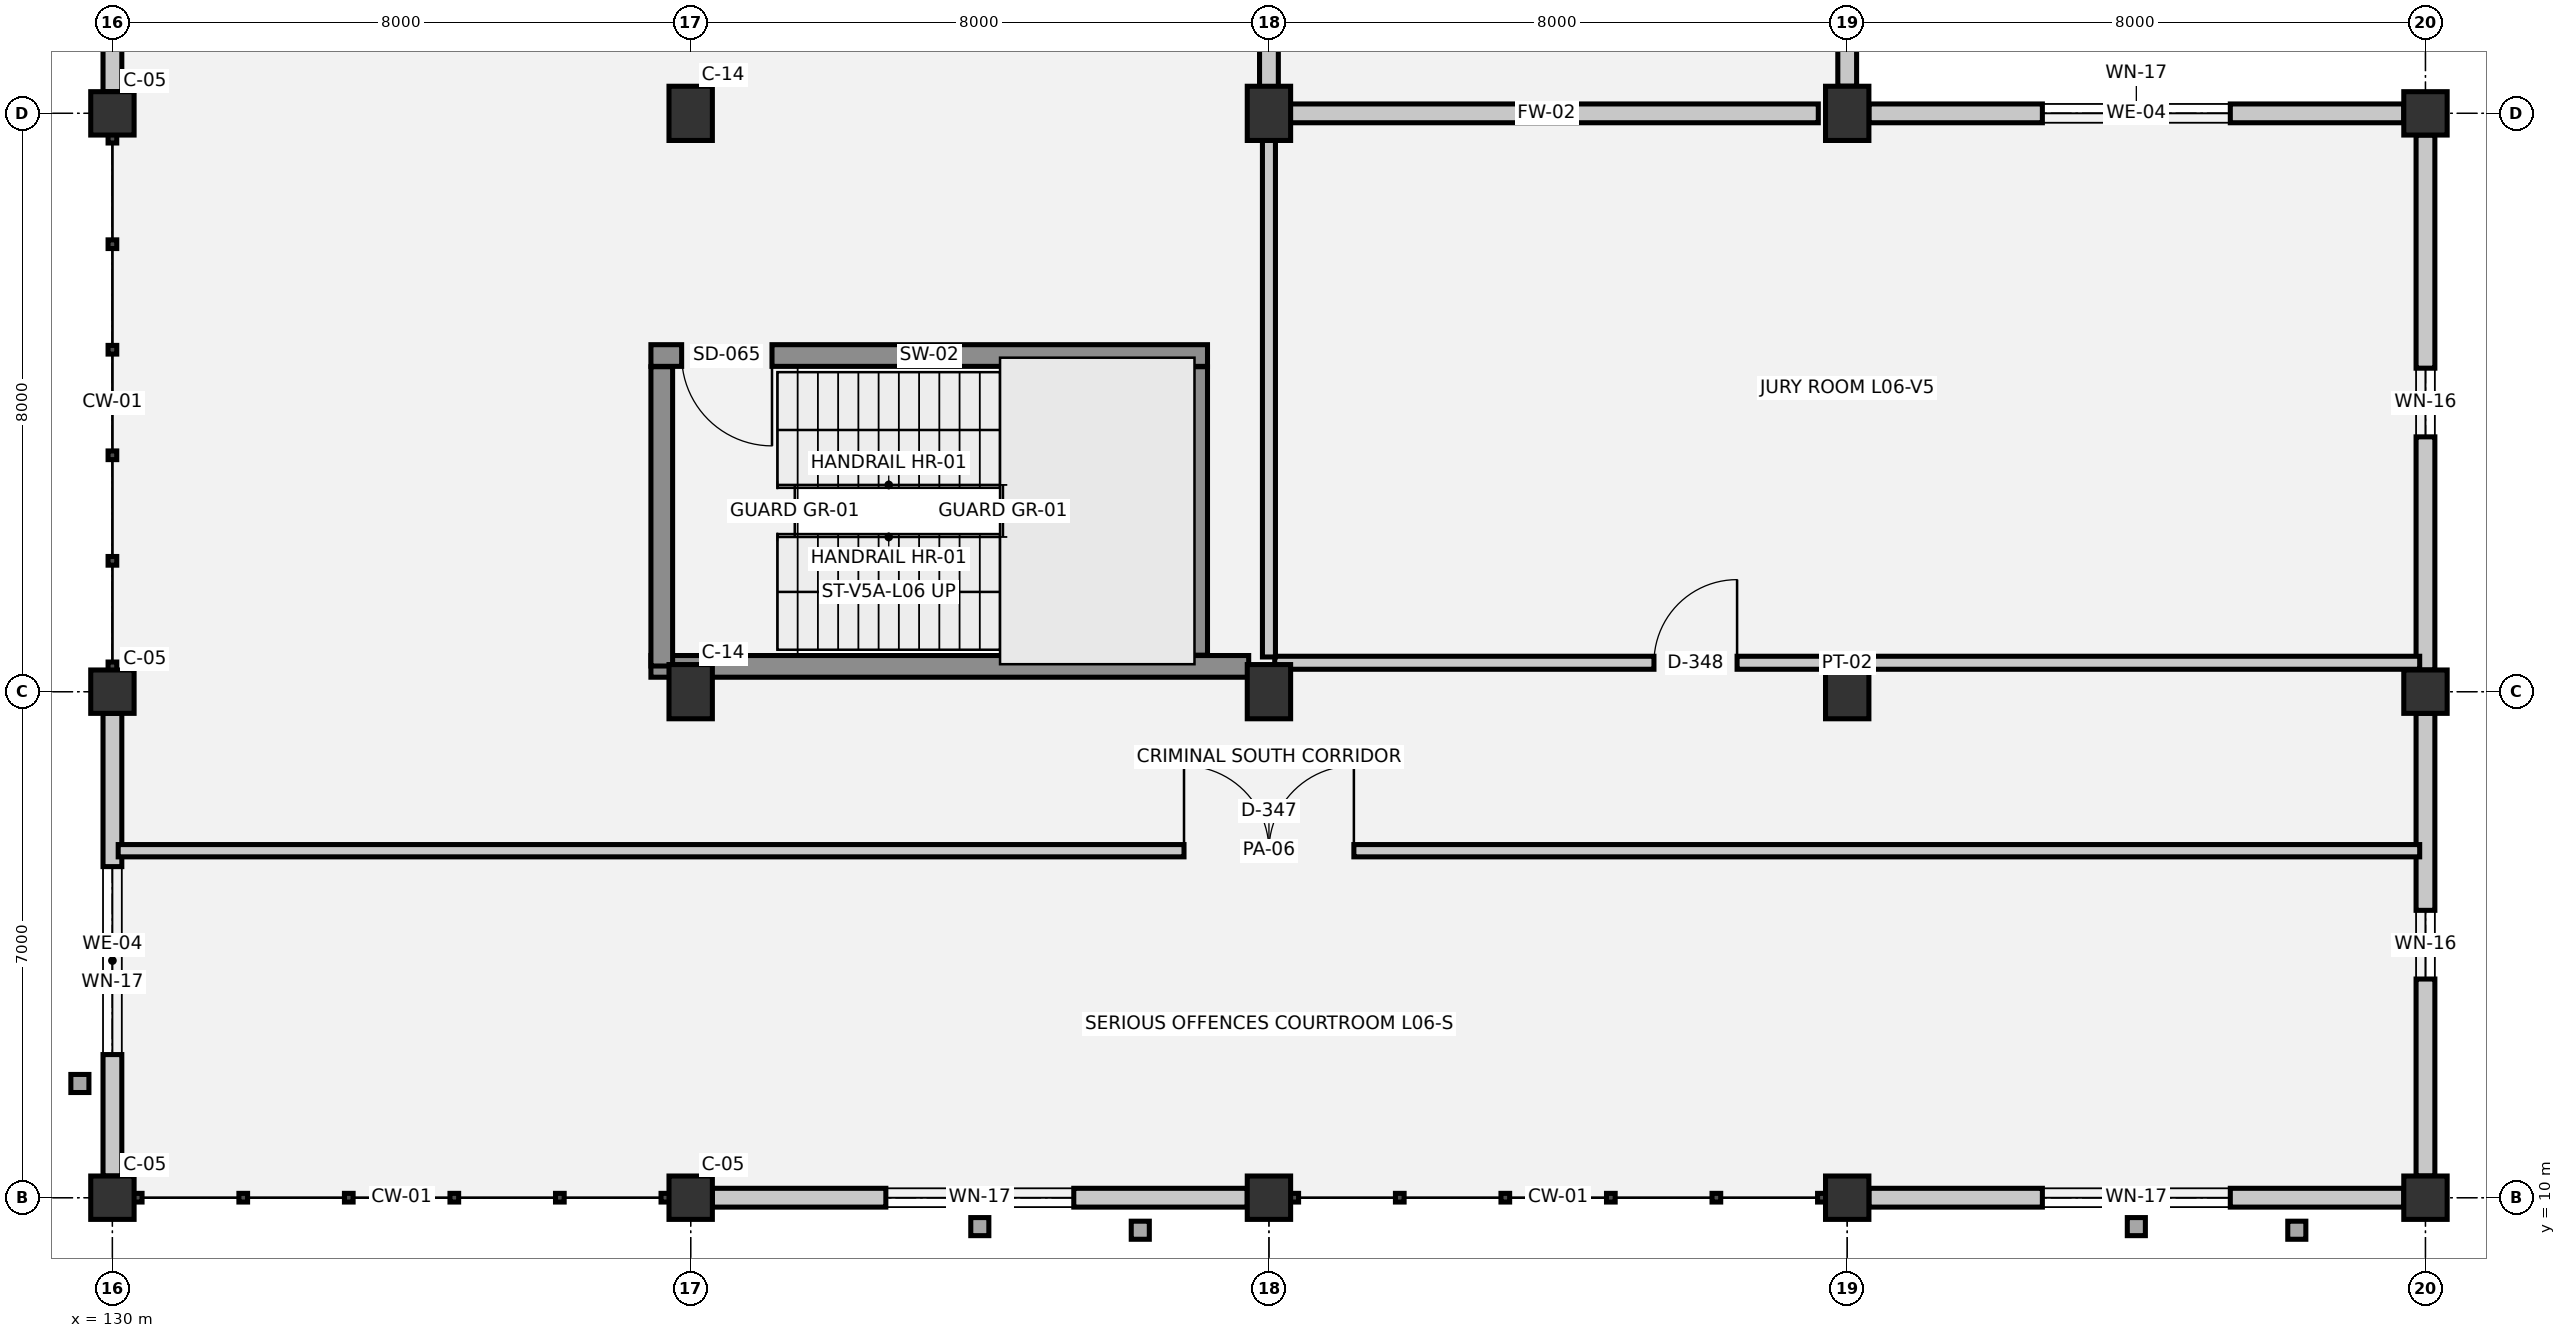
"""IFC4 building model, lengths in metres.
Left out: names, types, materials, properties, quantities, classifications, styles, units other than length and angle.
Written with IfcOpenShell. Run it as: python <this file> out.ifc"""

import sys

from ifc_helpers import new_model, si_unit, direction, frame, frame_2d, origin, origin_2d, place, context, subcontext, project, spatial, rectangle, extrude, element, fill, save


model = new_model("IFC4")
c1 = context("Model", 3, precision=1e-05, world=origin(), true_north=direction((0.0, 1.0)))
c2 = subcontext(c1, "Body", "Model", "MODEL_VIEW")
j1 = project(units=[si_unit("LENGTHUNIT", "METRE"), si_unit("PLANEANGLEUNIT", "RADIAN")], contexts=[c1])
p1 = place(None, origin())
s1 = spatial("IfcSite", under=j1, at=p1, CompositionType="ELEMENT")
p2 = place(p1, origin())
s2 = spatial("IfcBuilding", under=s1, at=p2, CompositionType="ELEMENT")
p3 = place(p2, frame((0.0, 0.0, 22.05)))
s3 = spatial("IfcBuildingStorey", under=s2, at=p3, CompositionType="ELEMENT", Elevation=22.05)
for number, where, z_axis, x_axis in (
    (1, (130.0, 10.0, 0.0), (0.0, 0.0, 1.0), (1.0, 0.0, 0.0)),
    (2, (130.0, 17.0, 0.0), (0.0, 0.0, 1.0), (1.0, 0.0, 0.0)),
    (3, (130.0, 25.0, 0.0), (0.0, 0.0, 1.0), (1.0, 0.0, 0.0)),
    (4, (138.0, 10.0, 0.0), (0.0, 0.0, 1.0), (1.0, 0.0, 0.0)),
):
    element("IfcColumn", number, at=place(p3, frame(where, z_axis=z_axis, x_axis=x_axis)), inside=s3, PredefinedType="COLUMN", context=c2, shape_type="SweptSolid", body=[
        extrude(rectangle(XDim=0.6, YDim=0.6, at=origin_2d()), origin(), (0.0, 0.0, 1.0), 3.75),
    ])
for number, where, z_axis, x_axis in (
    (5, (138.0, 17.0, 0.0), (0.0, 0.0, 1.0), (1.0, 0.0, 0.0)),
    (6, (138.0, 25.0, 0.0), (0.0, 0.0, 1.0), (1.0, 0.0, 0.0)),
):
    element("IfcColumn", number, at=place(p3, frame(where, z_axis=z_axis, x_axis=x_axis)), inside=s3, PredefinedType="COLUMN", context=c2, shape_type="SweptSolid", body=[
        extrude(rectangle(XDim=0.6, YDim=0.75, at=origin_2d()), origin(), (0.0, 0.0, 1.0), 3.75),
    ])
p4 = place(p3, frame((146.0, 10.0, 0.0), z_axis=(0.0, 0.0, 1.0), x_axis=(1.0, 0.0, 0.0)))
e7 = element("IfcColumn", 7, at=p4, inside=s3, PredefinedType="COLUMN", context=c2, shape_type="SweptSolid", body=[
    extrude(rectangle(XDim=0.6, YDim=0.6, at=origin_2d()), origin(), (0.0, 0.0, 1.0), 3.75),
])
for number, where, z_axis, x_axis in (
    (8, (146.0, 17.0, 0.0), (0.0, 0.0, 1.0), (1.0, 0.0, 0.0)),
    (9, (146.0, 25.0, 0.0), (0.0, 0.0, 1.0), (1.0, 0.0, 0.0)),
):
    element("IfcColumn", number, at=place(p3, frame(where, z_axis=z_axis, x_axis=x_axis)), inside=s3, PredefinedType="COLUMN", context=c2, shape_type="SweptSolid", body=[
        extrude(rectangle(XDim=0.6, YDim=0.75, at=origin_2d()), origin(), (0.0, 0.0, 1.0), 3.75),
    ])
p5 = place(p3, frame((154.0, 10.0, 0.0), z_axis=(0.0, 0.0, 1.0), x_axis=(1.0, 0.0, 0.0)))
e10 = element("IfcColumn", 10, at=p5, inside=s3, PredefinedType="COLUMN", context=c2, shape_type="SweptSolid", body=[
    extrude(rectangle(XDim=0.6, YDim=0.6, at=origin_2d()), origin(), (0.0, 0.0, 1.0), 3.75),
])
for number, where, z_axis, x_axis in (
    (11, (154.0, 17.0, 0.0), (0.0, 0.0, 1.0), (1.0, 0.0, 0.0)),
    (12, (154.0, 25.0, 0.0), (0.0, 0.0, 1.0), (1.0, 0.0, 0.0)),
):
    element("IfcColumn", number, at=place(p3, frame(where, z_axis=z_axis, x_axis=x_axis)), inside=s3, PredefinedType="COLUMN", context=c2, shape_type="SweptSolid", body=[
        extrude(rectangle(XDim=0.6, YDim=0.75, at=origin_2d()), origin(), (0.0, 0.0, 1.0), 3.75),
    ])
for number, where, z_axis, x_axis in (
    (13, (162.0, 10.0, 0.0), (0.0, 0.0, 1.0), (1.0, 0.0, 0.0)),
    (14, (162.0, 17.0, 0.0), (0.0, 0.0, 1.0), (1.0, 0.0, 0.0)),
    (15, (162.0, 25.0, 0.0), (0.0, 0.0, 1.0), (1.0, 0.0, 0.0)),
):
    element("IfcColumn", number, at=place(p3, frame(where, z_axis=z_axis, x_axis=x_axis)), inside=s3, PredefinedType="COLUMN", context=c2, shape_type="SweptSolid", body=[
        extrude(rectangle(XDim=0.6, YDim=0.6, at=origin_2d()), origin(), (0.0, 0.0, 1.0), 3.75),
    ])
p6 = place(p3, frame((130.0, 10.3, 0.0), z_axis=(0.0, 0.0, 1.0), x_axis=(0.0, 1.0, 0.0)))
e16 = element("IfcWall", 16, at=p6, inside=s3, PredefinedType="SOLIDWALL", context=c2, shape_type="SweptSolid", body=[
    extrude(rectangle(XDim=6.4, YDim=0.26, at=frame_2d((3.2, 0.0))), origin(), (0.0, 0.0, 1.0), 2.51),
])
p7 = place(p6, frame((1.68, 0.0, 1.0)))
e17 = element("IfcOpeningElement", 17, at=p7, cuts=e16, PredefinedType="OPENING", context=c2, shape_type="SweptSolid", body=[
    extrude(rectangle(XDim=2.6, YDim=1.1, at=frame_2d((1.3, 0.55))), frame((0.0, 0.14, 0.0), z_axis=(0.0, -1.0, 0.0), x_axis=(1.0, 0.0, 0.0)), (0.0, 0.0, 1.0), 0.28),
])
p8 = place(p3, frame((130.0, 25.3, 0.0), z_axis=(0.0, 0.0, 1.0), x_axis=(0.0, 1.0, 0.0)))
e18 = element("IfcWall", 18, at=p8, inside=s3, PredefinedType="SOLIDWALL", context=c2, shape_type="SweptSolid", body=[
    extrude(rectangle(XDim=6.4, YDim=0.26, at=frame_2d((3.2, 0.0))), origin(), (0.0, 0.0, 1.0), 2.51),
])
p9 = place(p8, frame((1.9, 0.0, 1.0)))
e19 = element("IfcOpeningElement", 19, at=p9, cuts=e18, PredefinedType="OPENING", context=c2, shape_type="SweptSolid", body=[
    extrude(rectangle(XDim=2.6, YDim=1.1, at=frame_2d((1.3, 0.55))), frame((0.0, 0.14, 0.0), z_axis=(0.0, -1.0, 0.0), x_axis=(1.0, 0.0, 0.0)), (0.0, 0.0, 1.0), 0.28),
])
p10 = place(p3, frame((154.0, 31.625, 0.0), z_axis=(0.0, 0.0, 1.0), x_axis=(0.0, -1.0, 0.0)))
e20 = element("IfcWall", 20, at=p10, inside=s3, PredefinedType="SOLIDWALL", context=c2, shape_type="SweptSolid", body=[
    extrude(rectangle(XDim=6.25, YDim=0.26, at=frame_2d((3.125, 0.0))), origin(), (0.0, 0.0, 1.0), 2.51),
])
p11 = place(p10, frame((2.65, 0.0, 1.0)))
e21 = element("IfcOpeningElement", 21, at=p11, cuts=e20, PredefinedType="OPENING", context=c2, shape_type="SweptSolid", body=[
    extrude(rectangle(XDim=0.95, YDim=1.1, at=frame_2d((0.475, 0.55))), frame((0.0, 0.14, 0.0), z_axis=(0.0, -1.0, 0.0), x_axis=(1.0, 0.0, 0.0)), (0.0, 0.0, 1.0), 0.28),
])
p12 = place(p3, frame((154.3, 25.0, 0.0), z_axis=(0.0, 0.0, 1.0), x_axis=(1.0, 0.0, 0.0)))
e22 = element("IfcWall", 22, at=p12, inside=s3, PredefinedType="SOLIDWALL", context=c2, shape_type="SweptSolid", body=[
    extrude(rectangle(XDim=7.4, YDim=0.26, at=frame_2d((3.7, 0.0))), origin(), (0.0, 0.0, 1.0), 2.51),
])
p13 = place(p12, frame((2.4, 0.0, 1.0)))
e23 = element("IfcOpeningElement", 23, at=p13, cuts=e22, PredefinedType="OPENING", context=c2, shape_type="SweptSolid", body=[
    extrude(rectangle(XDim=2.6, YDim=1.1, at=frame_2d((1.3, 0.55))), frame((0.0, 0.14, 0.0), z_axis=(0.0, -1.0, 0.0), x_axis=(1.0, 0.0, 0.0)), (0.0, 0.0, 1.0), 0.28),
])
p14 = place(p3, frame((162.0, 24.7, 0.0), z_axis=(0.0, 0.0, 1.0), x_axis=(0.0, -1.0, 0.0)))
e24 = element("IfcWall", 24, at=p14, inside=s3, PredefinedType="SOLIDWALL", context=c2, shape_type="SweptSolid", body=[
    extrude(rectangle(XDim=7.4, YDim=0.26, at=frame_2d((3.7, 0.0))), origin(), (0.0, 0.0, 1.0), 2.51),
])
p15 = place(p14, frame((3.225, 0.0, 1.0)))
e25 = element("IfcOpeningElement", 25, at=p15, cuts=e24, PredefinedType="OPENING", context=c2, shape_type="SweptSolid", body=[
    extrude(rectangle(XDim=0.95, YDim=1.1, at=frame_2d((0.475, 0.55))), frame((0.0, 0.14, 0.0), z_axis=(0.0, -1.0, 0.0), x_axis=(1.0, 0.0, 0.0)), (0.0, 0.0, 1.0), 0.28),
])
p16 = place(p3, frame((162.0, 16.7, 0.0), z_axis=(0.0, 0.0, 1.0), x_axis=(0.0, -1.0, 0.0)))
e26 = element("IfcWall", 26, at=p16, inside=s3, PredefinedType="SOLIDWALL", context=c2, shape_type="SweptSolid", body=[
    extrude(rectangle(XDim=6.4, YDim=0.26, at=frame_2d((3.2, 0.0))), origin(), (0.0, 0.0, 1.0), 2.51),
])
p17 = place(p16, frame((2.725, 0.0, 1.0)))
e27 = element("IfcOpeningElement", 27, at=p17, cuts=e26, PredefinedType="OPENING", context=c2, shape_type="SweptSolid", body=[
    extrude(rectangle(XDim=0.95, YDim=1.1, at=frame_2d((0.475, 0.55))), frame((0.0, 0.14, 0.0), z_axis=(0.0, -1.0, 0.0), x_axis=(1.0, 0.0, 0.0)), (0.0, 0.0, 1.0), 0.28),
])
p18 = place(p3, frame((161.7, 10.0, 0.0), z_axis=(0.0, 0.0, 1.0), x_axis=(-1.0, 0.0, 0.0)))
e28 = element("IfcWall", 28, at=p18, inside=s3, PredefinedType="SOLIDWALL", context=c2, shape_type="SweptSolid", body=[
    extrude(rectangle(XDim=7.4, YDim=0.26, at=frame_2d((3.7, 0.0))), origin(), (0.0, 0.0, 1.0), 2.51),
])
p19 = place(p18, frame((2.4, 0.0, 1.0)))
e29 = element("IfcOpeningElement", 29, at=p19, cuts=e28, PredefinedType="OPENING", context=c2, shape_type="SweptSolid", body=[
    extrude(rectangle(XDim=2.6, YDim=1.1, at=frame_2d((1.3, 0.55))), frame((0.0, 0.14, 0.0), z_axis=(0.0, -1.0, 0.0), x_axis=(1.0, 0.0, 0.0)), (0.0, 0.0, 1.0), 0.28),
])
p20 = place(p3, frame((145.7, 10.0, 0.0), z_axis=(0.0, 0.0, 1.0), x_axis=(-1.0, 0.0, 0.0)))
e30 = element("IfcWall", 30, at=p20, inside=s3, PredefinedType="SOLIDWALL", context=c2, shape_type="SweptSolid", body=[
    extrude(rectangle(XDim=7.4, YDim=0.26, at=frame_2d((3.7, 0.0))), origin(), (0.0, 0.0, 1.0), 2.51),
])
p21 = place(p20, frame((2.4, 0.0, 1.0)))
e31 = element("IfcOpeningElement", 31, at=p21, cuts=e30, PredefinedType="OPENING", context=c2, shape_type="SweptSolid", body=[
    extrude(rectangle(XDim=2.6, YDim=1.1, at=frame_2d((1.3, 0.55))), frame((0.0, 0.14, 0.0), z_axis=(0.0, -1.0, 0.0), x_axis=(1.0, 0.0, 0.0)), (0.0, 0.0, 1.0), 0.28),
])
p22 = place(p3, frame((145.15, 21.65, 0.0), z_axis=(0.0, 0.0, 1.0), x_axis=(-1.0, 0.0, 0.0)))
e32 = element("IfcWall", 32, at=p22, inside=s3, PredefinedType="SHEAR", context=c2, shape_type="SweptSolid", body=[
    extrude(rectangle(XDim=7.7, YDim=0.3, at=frame_2d((3.85, 0.0))), origin(), (0.0, 0.0, 1.0), 3.47),
])
p23 = place(p22, frame((6.025, 0.0, 0.0)))
e33 = element("IfcOpeningElement", 33, at=p23, cuts=e32, PredefinedType="OPENING", context=c2, shape_type="SweptSolid", body=[
    extrude(rectangle(XDim=1.25, YDim=2.15, at=frame_2d((0.625, 1.075))), frame((0.0, 0.16, 0.0), z_axis=(0.0, -1.0, 0.0), x_axis=(1.0, 0.0, 0.0)), (0.0, 0.0, 1.0), 0.32),
])
p24 = place(p3, frame((137.45, 17.35, 0.0), z_axis=(0.0, 0.0, 1.0), x_axis=(1.0, 0.0, 0.0)))
e34 = element("IfcWall", 34, at=p24, inside=s3, PredefinedType="SHEAR", context=c2, shape_type="SweptSolid", body=[
    extrude(rectangle(XDim=8.27, YDim=0.3, at=frame_2d((4.135, 0.0))), origin(), (0.0, 0.0, 1.0), 3.47),
])
p25 = place(p3, frame((137.6, 21.495, 0.0), z_axis=(0.0, 0.0, 1.0), x_axis=(0.0, -1.0, 0.0)))
e35 = element("IfcWall", 35, at=p25, inside=s3, PredefinedType="SHEAR", context=c2, shape_type="SweptSolid", body=[
    extrude(rectangle(XDim=4.14, YDim=0.3, at=frame_2d((2.07, 0.0))), origin(), (0.0, 0.0, 1.0), 3.47),
])
p26 = place(p3, frame((145.0, 17.505, 0.0), z_axis=(0.0, 0.0, 1.0), x_axis=(0.0, 1.0, 0.0)))
e36 = element("IfcWall", 36, at=p26, inside=s3, PredefinedType="SHEAR", context=c2, shape_type="SweptSolid", body=[
    extrude(rectangle(XDim=3.99, YDim=0.3, at=frame_2d((1.995, 0.0))), origin(), (0.0, 0.0, 1.0), 3.47),
])
p27 = place(p3, frame((130.08, 14.8, 0.0), z_axis=(0.0, 0.0, 1.0), x_axis=(1.0, 0.0, 0.0)))
e37 = element("IfcWall", 37, at=p27, inside=s3, PredefinedType="PARTITIONING", context=c2, shape_type="SweptSolid", body=[
    extrude(rectangle(XDim=31.84, YDim=0.17, at=frame_2d((15.92, 0.0))), origin(), (0.0, 0.0, 1.0), 3.39),
])
p28 = place(p27, frame((14.745, 0.0, 0.0)))
e38 = element("IfcOpeningElement", 38, at=p28, cuts=e37, PredefinedType="OPENING", context=c2, shape_type="SweptSolid", body=[
    extrude(rectangle(XDim=2.35, YDim=2.4, at=frame_2d((1.175, 1.2))), frame((0.0, 0.095, 0.0), z_axis=(0.0, -1.0, 0.0), x_axis=(1.0, 0.0, 0.0)), (0.0, 0.0, 1.0), 0.19),
])
p29 = place(p3, frame((146.08, 17.4, 0.0), z_axis=(0.0, 0.0, 1.0), x_axis=(1.0, 0.0, 0.0)))
e39 = element("IfcWall", 39, at=p29, inside=s3, PredefinedType="PARTITIONING", context=c2, shape_type="SweptSolid", body=[
    extrude(rectangle(XDim=15.84, YDim=0.18, at=frame_2d((7.92, 0.0))), origin(), (0.0, 0.0, 1.0), 3.39),
])
p30 = place(p29, frame((5.247, 0.0, 0.0)))
e40 = element("IfcOpeningElement", 40, at=p30, cuts=e39, PredefinedType="OPENING", context=c2, shape_type="SweptSolid", body=[
    extrude(rectangle(XDim=1.15, YDim=2.2, at=frame_2d((0.575, 1.1))), frame((0.0, 0.1, 0.0), z_axis=(0.0, -1.0, 0.0), x_axis=(1.0, 0.0, 0.0)), (0.0, 0.0, 1.0), 0.2),
])
p31 = place(p3, frame((146.08, 25.0, 0.0), z_axis=(0.0, 0.0, 1.0), x_axis=(1.0, 0.0, 0.0)))
e41 = element("IfcWall", 41, at=p31, inside=s3, PredefinedType="SOLIDWALL", context=c2, shape_type="SweptSolid", body=[
    extrude(rectangle(XDim=7.52, YDim=0.26, at=frame_2d((3.76, 0.0))), origin(), (0.0, 0.0, 1.0), 2.78),
])
p32 = place(p3, frame((146.0, 17.48, 0.0), z_axis=(0.0, 0.0, 1.0), x_axis=(0.0, 1.0, 0.0)))
e42 = element("IfcWall", 42, at=p32, inside=s3, PredefinedType="PARTITIONING", context=c2, shape_type="SweptSolid", body=[
    extrude(rectangle(XDim=7.44, YDim=0.18, at=frame_2d((3.72, 0.0))), origin(), (0.0, 0.0, 1.0), 2.53),
])
p33 = place(p3, frame((146.0, 25.08, 0.0), z_axis=(0.0, 0.0, 1.0), x_axis=(0.0, 1.0, 0.0)))
e43 = element("IfcWall", 43, at=p33, inside=s3, PredefinedType="SOLIDWALL", context=c2, shape_type="SweptSolid", body=[
    extrude(rectangle(XDim=18.84, YDim=0.26, at=frame_2d((9.42, 0.0))), origin(), (0.0, 0.0, 1.0), 2.93),
])
p34 = place(p33, frame((8.88, 0.0, 0.0)))
e44 = element("IfcOpeningElement", 44, at=p34, cuts=e43, PredefinedType="OPENING", context=c2, shape_type="SweptSolid", body=[
    extrude(rectangle(XDim=1.08, YDim=2.1, at=frame_2d((0.54, 1.05))), frame((0.0, 0.14, 0.0), z_axis=(0.0, -1.0, 0.0), x_axis=(1.0, 0.0, 0.0)), (0.0, 0.0, 1.0), 0.28),
])
p35 = place(p7, origin())
e45 = element("IfcWindow", 45, at=p35, inside=s3, PartitioningType="SINGLE_PANEL", PredefinedType="WINDOW", context=c2, shape_type="SweptSolid", body=[
    extrude(rectangle(XDim=2.6, YDim=1.1, at=frame_2d((1.3, 0.55))), frame((0.0, 0.03, 0.0), z_axis=(0.0, -1.0, 0.0), x_axis=(1.0, 0.0, 0.0)), (0.0, 0.0, 1.0), 0.06),
])
fill(e17, e45)
p36 = place(p13, origin())
e46 = element("IfcWindow", 46, at=p36, inside=s3, PartitioningType="SINGLE_PANEL", PredefinedType="WINDOW", context=c2, shape_type="SweptSolid", body=[
    extrude(rectangle(XDim=2.6, YDim=1.1, at=frame_2d((1.3, 0.55))), frame((0.0, 0.03, 0.0), z_axis=(0.0, -1.0, 0.0), x_axis=(1.0, 0.0, 0.0)), (0.0, 0.0, 1.0), 0.06),
])
fill(e23, e46)
p37 = place(p15, origin())
e47 = element("IfcWindow", 47, at=p37, inside=s3, PartitioningType="SINGLE_PANEL", PredefinedType="WINDOW", context=c2, shape_type="SweptSolid", body=[
    extrude(rectangle(XDim=0.95, YDim=1.1, at=frame_2d((0.475, 0.55))), frame((0.0, 0.03, 0.0), z_axis=(0.0, -1.0, 0.0), x_axis=(1.0, 0.0, 0.0)), (0.0, 0.0, 1.0), 0.06),
])
fill(e25, e47)
p38 = place(p17, origin())
e48 = element("IfcWindow", 48, at=p38, inside=s3, PartitioningType="SINGLE_PANEL", PredefinedType="WINDOW", context=c2, shape_type="SweptSolid", body=[
    extrude(rectangle(XDim=0.95, YDim=1.1, at=frame_2d((0.475, 0.55))), frame((0.0, 0.03, 0.0), z_axis=(0.0, -1.0, 0.0), x_axis=(1.0, 0.0, 0.0)), (0.0, 0.0, 1.0), 0.06),
])
fill(e27, e48)
p39 = place(p19, origin())
e49 = element("IfcWindow", 49, at=p39, inside=s3, PartitioningType="SINGLE_PANEL", PredefinedType="WINDOW", context=c2, shape_type="SweptSolid", body=[
    extrude(rectangle(XDim=2.6, YDim=1.1, at=frame_2d((1.3, 0.55))), frame((0.0, 0.03, 0.0), z_axis=(0.0, -1.0, 0.0), x_axis=(1.0, 0.0, 0.0)), (0.0, 0.0, 1.0), 0.06),
])
fill(e29, e49)
p40 = place(p21, origin())
e50 = element("IfcWindow", 50, at=p40, inside=s3, PartitioningType="SINGLE_PANEL", PredefinedType="WINDOW", context=c2, shape_type="SweptSolid", body=[
    extrude(rectangle(XDim=2.6, YDim=1.1, at=frame_2d((1.3, 0.55))), frame((0.0, 0.03, 0.0), z_axis=(0.0, -1.0, 0.0), x_axis=(1.0, 0.0, 0.0)), (0.0, 0.0, 1.0), 0.06),
])
fill(e31, e50)
p41 = place(p23, origin())
e51 = element("IfcDoor", 51, at=p41, inside=s3, OperationType="SINGLE_SWING_LEFT", PredefinedType="DOOR", context=c2, shape_type="SweptSolid", body=[
    extrude(rectangle(XDim=1.25, YDim=2.15, at=frame_2d((0.625, 1.075))), frame((0.0, 0.025, 0.0), z_axis=(0.0, -1.0, 0.0), x_axis=(1.0, 0.0, 0.0)), (0.0, 0.0, 1.0), 0.05),
])
fill(e33, e51)
p42 = place(p28, origin())
e52 = element("IfcDoor", 52, at=p42, inside=s3, OperationType="DOUBLE_DOOR_SINGLE_SWING", PredefinedType="DOOR", context=c2, shape_type="SweptSolid", body=[
    extrude(rectangle(XDim=2.35, YDim=2.4, at=frame_2d((1.175, 1.2))), frame((0.0, 0.025, 0.0), z_axis=(0.0, -1.0, 0.0), x_axis=(1.0, 0.0, 0.0)), (0.0, 0.0, 1.0), 0.05),
])
fill(e38, e52)
p43 = place(p30, origin())
e53 = element("IfcDoor", 53, at=p43, inside=s3, OperationType="SINGLE_SWING_RIGHT", PredefinedType="DOOR", context=c2, shape_type="SweptSolid", body=[
    extrude(rectangle(XDim=1.15, YDim=2.2, at=frame_2d((0.575, 1.1))), frame((0.0, 0.025, 0.0), z_axis=(0.0, -1.0, 0.0), x_axis=(1.0, 0.0, 0.0)), (0.0, 0.0, 1.0), 0.05),
])
fill(e40, e53)
save(model, sys.argv[1])
